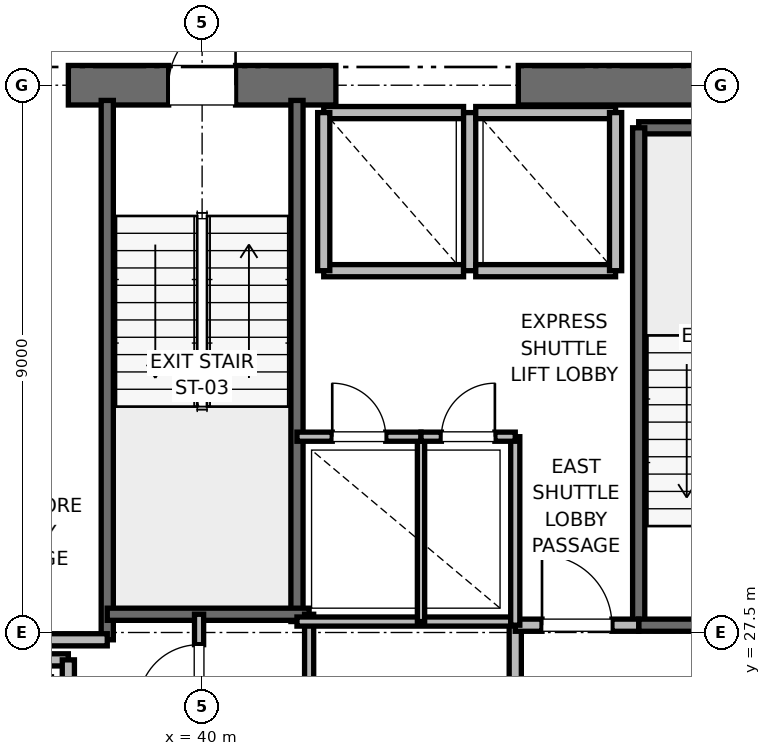
"""IFC4 building model, lengths in metres.
Left out: names, types, materials, properties, quantities, classifications, styles, units other than length and angle.
Written with IfcOpenShell. Run it as: python <this file> out.ifc"""

import sys

from ifc_helpers import new_model, si_unit, direction, frame, frame_2d, origin, place, context, subcontext, project, spatial, rectangle, extrude, element, fill, save


model = new_model("IFC4")
c1 = context("Model", 3, precision=1e-05, world=origin(), true_north=direction((0.0, 1.0)))
c2 = subcontext(c1, "Body", "Model", "MODEL_VIEW")
j1 = project(units=[si_unit("LENGTHUNIT", "METRE"), si_unit("PLANEANGLEUNIT", "RADIAN")], contexts=[c1])
p1 = place(None, origin())
s1 = spatial("IfcSite", under=j1, at=p1, CompositionType="ELEMENT")
p2 = place(p1, origin())
s2 = spatial("IfcBuilding", under=s1, at=p2, CompositionType="ELEMENT")
p3 = place(p2, frame((0.0, 0.0, 63.6)))
s3 = spatial("IfcBuildingStorey", under=s2, at=p3, CompositionType="ELEMENT", Elevation=63.6)
p4 = place(p3, frame((37.8, 36.5, 0.0), z_axis=(0.0, 0.0, 1.0), x_axis=(1.0, 0.0, 0.0)))
e1 = element("IfcWall", 1, at=p4, inside=s3, PredefinedType="SHEAR", context=c2, shape_type="SweptSolid", body=[
    extrude(rectangle(XDim=4.4, YDim=0.65, at=frame_2d((2.2, 0.0))), origin(), (0.0, 0.0, 1.0), 3.76),
])
p5 = place(p4, frame((1.65, 0.0, 0.0)))
e2 = element("IfcOpeningElement", 2, at=p5, cuts=e1, PredefinedType="OPENING", context=c2, shape_type="SweptSolid", body=[
    extrude(rectangle(XDim=1.1, YDim=2.15, at=frame_2d((0.55, 1.075))), frame((0.0, 0.325, 0.0), z_axis=(0.0, -1.0, 0.0), x_axis=(1.0, 0.0, 0.0)), (0.0, 0.0, 1.0), 0.65),
])
p6 = place(p3, frame((45.2, 36.5, 0.0), z_axis=(0.0, 0.0, 1.0), x_axis=(1.0, 0.0, 0.0)))
e3 = element("IfcWall", 3, at=p6, inside=s3, PredefinedType="SHEAR", context=c2, shape_type="SweptSolid", body=[
    extrude(rectangle(XDim=5.8, YDim=0.65, at=frame_2d((2.9, 0.0))), origin(), (0.0, 0.0, 1.0), 3.76),
])
p7 = place(p3, frame((47.18, 35.8, 0.0), z_axis=(0.0, 0.0, 1.0), x_axis=(1.0, 0.0, 0.0)))
e4 = element("IfcWall", 4, at=p7, inside=s3, PredefinedType="SOLIDWALL", context=c2, shape_type="SweptSolid", body=[
    extrude(rectangle(XDim=3.12, YDim=0.2, at=frame_2d((1.56, 0.0))), origin(), (0.0, 0.0, 1.0), 3.76),
])
p8 = place(p3, frame((47.18, 27.62, 0.0), z_axis=(0.0, 0.0, 1.0), x_axis=(0.0, 1.0, 0.0)))
e5 = element("IfcWall", 5, at=p8, inside=s3, PredefinedType="SOLIDWALL", context=c2, shape_type="SweptSolid", body=[
    extrude(rectangle(XDim=8.18, YDim=0.2, at=frame_2d((4.09, 0.0))), origin(), (0.0, 0.0, 1.0), 3.76),
])
p9 = place(p3, frame((47.18, 27.62, 0.0), z_axis=(0.0, 0.0, 1.0), x_axis=(1.0, 0.0, 0.0)))
e6 = element("IfcWall", 6, at=p9, inside=s3, PredefinedType="SOLIDWALL", context=c2, shape_type="SweptSolid", body=[
    extrude(rectangle(XDim=3.12, YDim=0.2, at=frame_2d((1.56, 0.0))), origin(), (0.0, 0.0, 1.0), 3.76),
])
p10 = place(p9, frame((1.01, 0.0, 0.0)))
e7 = element("IfcOpeningElement", 7, at=p10, cuts=e6, PredefinedType="OPENING", context=c2, shape_type="SweptSolid", body=[
    extrude(rectangle(XDim=1.1, YDim=2.15, at=frame_2d((0.55, 1.075))), frame((0.0, 0.1, 0.0), z_axis=(0.0, -1.0, 0.0), x_axis=(1.0, 0.0, 0.0)), (0.0, 0.0, 1.0), 0.2),
])
p11 = place(p3, frame((38.44, 27.38, 0.0), z_axis=(0.0, 0.0, 1.0), x_axis=(0.0, 1.0, 0.0)))
e8 = element("IfcWall", 8, at=p11, inside=s3, PredefinedType="SOLIDWALL", context=c2, shape_type="SweptSolid", body=[
    extrude(rectangle(XDim=8.87, YDim=0.2, at=frame_2d((4.435, 0.0))), origin(), (0.0, 0.0, 1.0), 3.76),
])
p12 = place(p3, frame((41.56, 27.68, 0.0), z_axis=(0.0, 0.0, 1.0), x_axis=(0.0, 1.0, 0.0)))
e9 = element("IfcWall", 9, at=p12, inside=s3, PredefinedType="SOLIDWALL", context=c2, shape_type="SweptSolid", body=[
    extrude(rectangle(XDim=8.57, YDim=0.2, at=frame_2d((4.285, 0.0))), origin(), (0.0, 0.0, 1.0), 3.76),
])
p13 = place(p3, frame((38.44, 27.8, 0.0), z_axis=(0.0, 0.0, 1.0), x_axis=(1.0, 0.0, 0.0)))
e10 = element("IfcWall", 10, at=p13, inside=s3, PredefinedType="SOLIDWALL", context=c2, shape_type="SweptSolid", body=[
    extrude(rectangle(XDim=3.32, YDim=0.2, at=frame_2d((1.66, 0.0))), origin(), (0.0, 0.0, 1.0), 3.76),
])
p14 = place(p3, frame((32.82, 27.38, 0.0), z_axis=(0.0, 0.0, 1.0), x_axis=(1.0, 0.0, 0.0)))
e11 = element("IfcWall", 11, at=p14, inside=s3, PredefinedType="PARTITIONING", context=c2, shape_type="SweptSolid", body=[
    extrude(rectangle(XDim=5.62, YDim=0.2, at=frame_2d((2.81, 0.0))), origin(), (0.0, 0.0, 1.0), 3.76),
])
p15 = place(p3, frame((45.15, 24.25, 0.0), z_axis=(0.0, 0.0, 1.0), x_axis=(0.0, 1.0, 0.0)))
e12 = element("IfcWall", 12, at=p15, inside=s3, PredefinedType="PARTITIONING", context=c2, shape_type="SweptSolid", body=[
    extrude(rectangle(XDim=3.37, YDim=0.2, at=frame_2d((1.685, 0.0))), origin(), (0.0, 0.0, 1.0), 3.76),
])
p16 = place(p3, frame((45.15, 27.62, 0.0), z_axis=(0.0, 0.0, 1.0), x_axis=(1.0, 0.0, 0.0)))
e13 = element("IfcWall", 13, at=p16, inside=s3, PredefinedType="PARTITIONING", context=c2, shape_type="SweptSolid", body=[
    extrude(rectangle(XDim=2.03, YDim=0.2, at=frame_2d((1.015, 0.0))), origin(), (0.0, 0.0, 1.0), 3.76),
])
p17 = place(p16, frame((0.44, 0.0, 0.0)))
e14 = element("IfcOpeningElement", 14, at=p17, cuts=e13, PredefinedType="OPENING", context=c2, shape_type="SweptSolid", body=[
    extrude(rectangle(XDim=1.15, YDim=2.2, at=frame_2d((0.575, 1.1))), frame((0.0, 0.1, 0.0), z_axis=(0.0, -1.0, 0.0), x_axis=(1.0, 0.0, 0.0)), (0.0, 0.0, 1.0), 0.2),
])
p18 = place(p3, frame((37.8, 27.05, 0.0), z_axis=(0.0, 0.0, 1.0), x_axis=(-1.0, 0.0, 0.0)))
e15 = element("IfcWall", 15, at=p18, inside=s3, PredefinedType="SOLIDWALL", context=c2, shape_type="SweptSolid", body=[
    extrude(rectangle(XDim=2.3, YDim=0.2, at=frame_2d((1.15, 0.0))), origin(), (0.0, 0.0, 1.0), 3.76),
])
p19 = place(p3, frame((37.8, 24.45, 0.0), z_axis=(0.0, 0.0, 1.0), x_axis=(0.0, 1.0, 0.0)))
e16 = element("IfcWall", 16, at=p19, inside=s3, PredefinedType="SOLIDWALL", context=c2, shape_type="SweptSolid", body=[
    extrude(rectangle(XDim=2.6, YDim=0.2, at=frame_2d((1.3, 0.0))), origin(), (0.0, 0.0, 1.0), 3.76),
])
p20 = place(p3, frame((42.0, 33.45, 0.0), z_axis=(0.0, 0.0, 1.0), x_axis=(1.0, 0.0, 0.0)))
e17 = element("IfcWall", 17, at=p20, inside=s3, PredefinedType="SOLIDWALL", context=c2, shape_type="SweptSolid", body=[
    extrude(rectangle(XDim=2.3, YDim=0.2, at=frame_2d((1.15, 0.0))), origin(), (0.0, 0.0, 1.0), 3.76),
])
p21 = place(p3, frame((44.3, 36.05, 0.0), z_axis=(0.0, 0.0, 1.0), x_axis=(-1.0, 0.0, 0.0)))
e18 = element("IfcWall", 18, at=p21, inside=s3, PredefinedType="SOLIDWALL", context=c2, shape_type="SweptSolid", body=[
    extrude(rectangle(XDim=2.3, YDim=0.2, at=frame_2d((1.15, 0.0))), origin(), (0.0, 0.0, 1.0), 2.54),
])
for number, where, z_axis, x_axis in (
    (19, (42.0, 36.05, 0.0), (0.0, 0.0, 1.0), (0.0, -1.0, 0.0)),
    (20, (44.4, 33.45, 0.0), (0.0, 0.0, 1.0), (0.0, 1.0, 0.0)),
):
    element("IfcWall", number, at=place(p3, frame(where, z_axis=z_axis, x_axis=x_axis)), inside=s3, PredefinedType="SOLIDWALL", context=c2, shape_type="SweptSolid", body=[
        extrude(rectangle(XDim=2.6, YDim=0.2, at=frame_2d((1.3, 0.0))), origin(), (0.0, 0.0, 1.0), 2.54),
    ])
p22 = place(p3, frame((44.5, 33.45, 0.0), z_axis=(0.0, 0.0, 1.0), x_axis=(1.0, 0.0, 0.0)))
e21 = element("IfcWall", 21, at=p22, inside=s3, PredefinedType="SOLIDWALL", context=c2, shape_type="SweptSolid", body=[
    extrude(rectangle(XDim=2.3, YDim=0.2, at=frame_2d((1.15, 0.0))), origin(), (0.0, 0.0, 1.0), 3.76),
])
p23 = place(p3, frame((46.8, 36.05, 0.0), z_axis=(0.0, 0.0, 1.0), x_axis=(-1.0, 0.0, 0.0)))
e22 = element("IfcWall", 22, at=p23, inside=s3, PredefinedType="SOLIDWALL", context=c2, shape_type="SweptSolid", body=[
    extrude(rectangle(XDim=2.3, YDim=0.2, at=frame_2d((1.15, 0.0))), origin(), (0.0, 0.0, 1.0), 2.54),
])
p24 = place(p3, frame((46.8, 33.45, 0.0), z_axis=(0.0, 0.0, 1.0), x_axis=(0.0, 1.0, 0.0)))
e23 = element("IfcWall", 23, at=p24, inside=s3, PredefinedType="SOLIDWALL", context=c2, shape_type="SweptSolid", body=[
    extrude(rectangle(XDim=2.6, YDim=0.2, at=frame_2d((1.3, 0.0))), origin(), (0.0, 0.0, 1.0), 3.76),
])
p25 = place(p3, frame((41.76, 23.8, 0.0), z_axis=(0.0, 0.0, 1.0), x_axis=(0.0, 1.0, 0.0)))
e24 = element("IfcWall", 24, at=p25, inside=s3, PredefinedType="PARTITIONING", context=c2, shape_type="SweptSolid", body=[
    extrude(rectangle(XDim=4.0, YDim=0.15, at=frame_2d((2.0, 0.0))), origin(), (0.0, 0.0, 1.0), 2.85),
])
p26 = place(p3, frame((39.95, 25.8, 0.0), z_axis=(0.0, 0.0, 1.0), x_axis=(0.0, 1.0, 0.0)))
e25 = element("IfcWall", 25, at=p26, inside=s3, PredefinedType="PARTITIONING", context=c2, shape_type="SweptSolid", body=[
    extrude(rectangle(XDim=2.0, YDim=0.15, at=frame_2d((1.0, 0.0))), origin(), (0.0, 0.0, 1.0), 2.85),
])
p27 = place(p26, frame((0.5, 0.0, 0.0)))
e26 = element("IfcOpeningElement", 26, at=p27, cuts=e25, PredefinedType="OPENING", context=c2, shape_type="SweptSolid", body=[
    extrude(rectangle(XDim=1.0, YDim=2.15, at=frame_2d((0.5, 1.075))), frame((0.0, 0.075, 0.0), z_axis=(0.0, -1.0, 0.0), x_axis=(1.0, 0.0, 0.0)), (0.0, 0.0, 1.0), 0.15),
])
p28 = place(p3, frame((41.56, 27.68, 0.0), z_axis=(0.0, 0.0, 1.0), x_axis=(1.0, 0.0, 0.0)))
e27 = element("IfcWall", 27, at=p28, inside=s3, PredefinedType="PARTITIONING", context=c2, shape_type="SweptSolid", body=[
    extrude(rectangle(XDim=3.59, YDim=0.15, at=frame_2d((1.795, 0.0))), origin(), (0.0, 0.0, 1.0), 2.85),
])
p29 = place(p3, frame((45.15, 27.62, 0.0), z_axis=(0.0, 0.0, 1.0), x_axis=(0.0, 1.0, 0.0)))
e28 = element("IfcWall", 28, at=p29, inside=s3, PredefinedType="PARTITIONING", context=c2, shape_type="SweptSolid", body=[
    extrude(rectangle(XDim=3.1, YDim=0.15, at=frame_2d((1.55, 0.0))), origin(), (0.0, 0.0, 1.0), 2.85),
])
p30 = place(p3, frame((43.6, 27.68, 0.0), z_axis=(0.0, 0.0, 1.0), x_axis=(0.0, 1.0, 0.0)))
e29 = element("IfcWall", 29, at=p30, inside=s3, PredefinedType="PARTITIONING", context=c2, shape_type="SweptSolid", body=[
    extrude(rectangle(XDim=3.04, YDim=0.12, at=frame_2d((1.52, 0.0))), origin(), (0.0, 0.0, 1.0), 2.85),
])
p31 = place(p3, frame((41.56, 30.72, 0.0), z_axis=(0.0, 0.0, 1.0), x_axis=(1.0, 0.0, 0.0)))
e30 = element("IfcWall", 30, at=p31, inside=s3, PredefinedType="PARTITIONING", context=c2, shape_type="SweptSolid", body=[
    extrude(rectangle(XDim=2.04, YDim=0.15, at=frame_2d((1.02, 0.0))), origin(), (0.0, 0.0, 1.0), 2.85),
])
p32 = place(p31, frame((0.58, 0.0, 0.0)))
e31 = element("IfcOpeningElement", 31, at=p32, cuts=e30, PredefinedType="OPENING", context=c2, shape_type="SweptSolid", body=[
    extrude(rectangle(XDim=0.88, YDim=2.1, at=frame_2d((0.44, 1.05))), frame((0.0, 0.075, 0.0), z_axis=(0.0, -1.0, 0.0), x_axis=(1.0, 0.0, 0.0)), (0.0, 0.0, 1.0), 0.15),
])
p33 = place(p3, frame((43.6, 30.72, 0.0), z_axis=(0.0, 0.0, 1.0), x_axis=(1.0, 0.0, 0.0)))
e32 = element("IfcWall", 32, at=p33, inside=s3, PredefinedType="PARTITIONING", context=c2, shape_type="SweptSolid", body=[
    extrude(rectangle(XDim=1.55, YDim=0.15, at=frame_2d((0.775, 0.0))), origin(), (0.0, 0.0, 1.0), 2.85),
])
p34 = place(p33, frame((0.335, 0.0, 0.0)))
e33 = element("IfcOpeningElement", 33, at=p34, cuts=e32, PredefinedType="OPENING", context=c2, shape_type="SweptSolid", body=[
    extrude(rectangle(XDim=0.88, YDim=2.1, at=frame_2d((0.44, 1.05))), frame((0.0, 0.075, 0.0), z_axis=(0.0, -1.0, 0.0), x_axis=(1.0, 0.0, 0.0)), (0.0, 0.0, 1.0), 0.15),
])
p35 = place(p5, origin())
e34 = element("IfcDoor", 34, at=p35, inside=s3, OperationType="SINGLE_SWING_RIGHT", PredefinedType="DOOR", context=c2, shape_type="SweptSolid", body=[
    extrude(rectangle(XDim=1.1, YDim=2.15, at=frame_2d((0.55, 1.075))), frame((0.0, 0.025, 0.0), z_axis=(0.0, -1.0, 0.0), x_axis=(1.0, 0.0, 0.0)), (0.0, 0.0, 1.0), 0.05),
])
fill(e2, e34)
p36 = place(p17, origin())
e35 = element("IfcDoor", 35, at=p36, inside=s3, OperationType="SINGLE_SWING_LEFT", PredefinedType="DOOR", context=c2, shape_type="SweptSolid", body=[
    extrude(rectangle(XDim=1.15, YDim=2.2, at=frame_2d((0.575, 1.1))), frame((0.0, 0.025, 0.0), z_axis=(0.0, -1.0, 0.0), x_axis=(1.0, 0.0, 0.0)), (0.0, 0.0, 1.0), 0.05),
])
fill(e14, e35)
p37 = place(p27, origin())
e36 = element("IfcDoor", 36, at=p37, inside=s3, OperationType="SINGLE_SWING_LEFT", PredefinedType="DOOR", context=c2, shape_type="SweptSolid", body=[
    extrude(rectangle(XDim=1.0, YDim=2.15, at=frame_2d((0.5, 1.075))), frame((0.0, 0.025, 0.0), z_axis=(0.0, -1.0, 0.0), x_axis=(1.0, 0.0, 0.0)), (0.0, 0.0, 1.0), 0.05),
])
fill(e26, e36)
p38 = place(p32, origin())
e37 = element("IfcDoor", 37, at=p38, inside=s3, OperationType="SINGLE_SWING_LEFT", PredefinedType="DOOR", context=c2, shape_type="SweptSolid", body=[
    extrude(rectangle(XDim=0.88, YDim=2.1, at=frame_2d((0.44, 1.05))), frame((0.0, 0.025, 0.0), z_axis=(0.0, -1.0, 0.0), x_axis=(1.0, 0.0, 0.0)), (0.0, 0.0, 1.0), 0.05),
])
fill(e31, e37)
p39 = place(p34, origin())
e38 = element("IfcDoor", 38, at=p39, inside=s3, OperationType="SINGLE_SWING_RIGHT", PredefinedType="DOOR", context=c2, shape_type="SweptSolid", body=[
    extrude(rectangle(XDim=0.88, YDim=2.1, at=frame_2d((0.44, 1.05))), frame((0.0, 0.025, 0.0), z_axis=(0.0, -1.0, 0.0), x_axis=(1.0, 0.0, 0.0)), (0.0, 0.0, 1.0), 0.05),
])
fill(e33, e38)
save(model, sys.argv[1])
